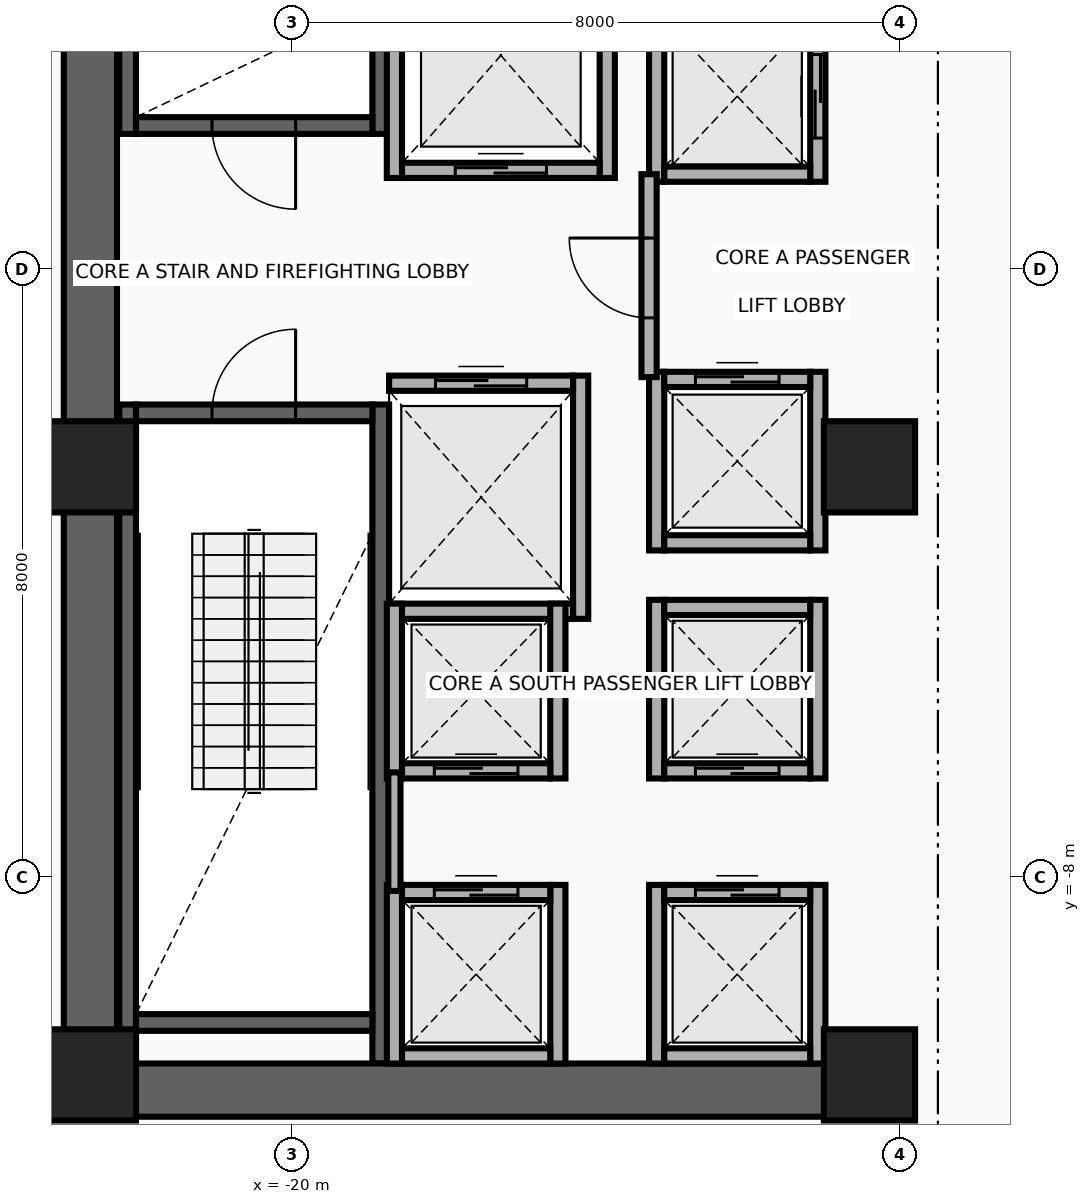
"""IFC4 building model, lengths in metres.
Left out: names, types, materials, properties, quantities, classifications, styles, units other than length and angle.
Written with IfcOpenShell. Run it as: python <this file> out.ifc"""

import sys

from ifc_helpers import new_model, si_unit, direction, frame, frame_2d, origin, origin_2d, place, context, subcontext, project, spatial, rectangle, extrude, source, transform, mapped, element, fill, save


model = new_model("IFC4")
c1 = context("Model", 3, precision=1e-05, world=origin(), true_north=direction((0.0, 1.0)))
c2 = subcontext(c1, "Body", "Model", "MODEL_VIEW")
j1 = project(units=[si_unit("LENGTHUNIT", "METRE"), si_unit("PLANEANGLEUNIT", "RADIAN")], contexts=[c1])
p1 = place(None, origin())
s1 = spatial("IfcSite", under=j1, at=p1, CompositionType="ELEMENT")
p2 = place(p1, origin())
s2 = spatial("IfcBuilding", under=s1, at=p2, CompositionType="ELEMENT")
p3 = place(p2, frame((0.0, 0.0, 101.1)))
s3 = spatial("IfcBuildingStorey", under=s2, at=p3, CompositionType="ELEMENT", Elevation=101.1)
for number, where, z_axis, x_axis in (
    (1, (-22.16, 1.78, 0.0), (0.0, 0.0, 1.0), (0.0, 1.0, 0.0)),
    (2, (-18.83, 1.78, 0.0), (0.0, 0.0, 1.0), (0.0, 1.0, 0.0)),
):
    element("IfcWall", number, at=place(p3, frame(where, z_axis=z_axis, x_axis=x_axis)), inside=s3, PredefinedType="SHEAR", context=c2, shape_type="SweptSolid", body=[
        extrude(rectangle(XDim=8.67, YDim=0.22, at=frame_2d((4.335, 0.0))), origin(), (0.0, 0.0, 1.0), 4.36),
    ])
p4 = place(p3, frame((-22.05, 1.89, 0.0), z_axis=(0.0, 0.0, 1.0), x_axis=(1.0, 0.0, 0.0)))
e3 = element("IfcWall", 3, at=p4, inside=s3, PredefinedType="SHEAR", context=c2, shape_type="SweptSolid", body=[
    extrude(rectangle(XDim=3.11, YDim=0.22, at=frame_2d((1.555, 0.0))), origin(), (0.0, 0.0, 1.0), 4.36),
])
p5 = place(p4, frame((1.0, 0.0, 0.0)))
e4 = element("IfcOpeningElement", 4, at=p5, cuts=e3, PredefinedType="OPENING", context=c2, shape_type="SweptSolid", body=[
    extrude(rectangle(XDim=1.1, YDim=2.15, at=frame_2d((0.55, 1.075))), frame((0.0, 0.125, 0.0), z_axis=(0.0, -1.0, 0.0), x_axis=(1.0, 0.0, 0.0)), (0.0, 0.0, 1.0), 0.25),
])
for number, where, z_axis, x_axis in (
    (5, (-22.16, -10.45, 0.0), (0.0, 0.0, 1.0), (0.0, 1.0, 0.0)),
    (6, (-18.83, -10.45, 0.0), (0.0, 0.0, 1.0), (0.0, 1.0, 0.0)),
):
    element("IfcWall", number, at=place(p3, frame(where, z_axis=z_axis, x_axis=x_axis)), inside=s3, PredefinedType="SHEAR", context=c2, shape_type="SweptSolid", body=[
        extrude(rectangle(XDim=8.67, YDim=0.22, at=frame_2d((4.335, 0.0))), origin(), (0.0, 0.0, 1.0), 4.36),
    ])
p6 = place(p3, frame((-22.05, -9.91, 0.0), z_axis=(0.0, 0.0, 1.0), x_axis=(1.0, 0.0, 0.0)))
e7 = element("IfcWall", 7, at=p6, inside=s3, PredefinedType="SHEAR", context=c2, shape_type="SweptSolid", body=[
    extrude(rectangle(XDim=3.11, YDim=0.22, at=frame_2d((1.555, 0.0))), origin(), (0.0, 0.0, 1.0), 4.36),
])
p7 = place(p3, frame((-22.05, -1.89, 0.0), z_axis=(0.0, 0.0, 1.0), x_axis=(1.0, 0.0, 0.0)))
e8 = element("IfcWall", 8, at=p7, inside=s3, PredefinedType="SHEAR", context=c2, shape_type="SweptSolid", body=[
    extrude(rectangle(XDim=3.11, YDim=0.22, at=frame_2d((1.555, 0.0))), origin(), (0.0, 0.0, 1.0), 4.36),
])
p8 = place(p7, frame((1.0, 0.0, 0.0)))
e9 = element("IfcOpeningElement", 9, at=p8, cuts=e8, PredefinedType="OPENING", context=c2, shape_type="SweptSolid", body=[
    extrude(rectangle(XDim=1.1, YDim=2.15, at=frame_2d((0.55, 1.075))), frame((0.0, 0.125, 0.0), z_axis=(0.0, -1.0, 0.0), x_axis=(1.0, 0.0, 0.0)), (0.0, 0.0, 1.0), 0.25),
])
p9 = place(p3, frame((-22.65, -11.15, 0.0), z_axis=(0.0, 0.0, 1.0), x_axis=(0.0, 1.0, 0.0)))
e10 = element("IfcWall", 10, at=p9, inside=s3, PredefinedType="SHEAR", context=c2, shape_type="SweptSolid", body=[
    extrude(rectangle(XDim=22.3, YDim=0.7, at=frame_2d((11.15, 0.0))), origin(), (0.0, 0.0, 1.0), 4.36),
])
p10 = place(p3, frame((-22.65, -10.8, 0.0), z_axis=(0.0, 0.0, 1.0), x_axis=(1.0, 0.0, 0.0)))
e11 = element("IfcWall", 11, at=p10, inside=s3, PredefinedType="SHEAR", context=c2, shape_type="SweptSolid", body=[
    extrude(rectangle(XDim=10.25, YDim=0.7, at=frame_2d((5.125, 0.0))), origin(), (0.0, 0.0, 1.0), 4.36),
])
m1 = source(origin(), c2, "Body", "SweptSolid", [
    extrude(rectangle(XDim=1.2, YDim=1.2, at=origin_2d()), origin(), (0.0, 0.0, 1.0), 4.6),
])
for number, where, z_axis, x_axis in (
    (12, (-22.65, -10.6, 0.0), (0.0, 0.0, 1.0), (1.0, 0.0, 0.0)),
    (13, (-12.4, -10.6, 0.0), (0.0, 0.0, 1.0), (1.0, 0.0, 0.0)),
    (14, (-22.65, -2.6, 0.0), (0.0, 0.0, 1.0), (1.0, 0.0, 0.0)),
    (15, (-12.4, -2.6, 0.0), (0.0, 0.0, 1.0), (1.0, 0.0, 0.0)),
):
    element("IfcColumn", number, at=place(p3, frame(where, z_axis=z_axis, x_axis=x_axis)), inside=s3, PredefinedType="COLUMN", context=c2, shape_type="MappedRepresentation", body=[
        mapped(m1, transform((0.0, 0.0, 0.0), x_axis=(1.0, 0.0, 0.0), y_axis=(0.0, 1.0, 0.0), z_axis=(0.0, 0.0, 1.0), scale=1.0)),
    ])
for number, where, z_axis, x_axis in (
    (16, (-18.65, 1.2, 0.0), (0.0, 0.0, 1.0), (0.0, 1.0, 0.0)),
    (17, (-15.85, 1.2, 0.0), (0.0, 0.0, 1.0), (0.0, 1.0, 0.0)),
):
    element("IfcWall", number, at=place(p3, frame(where, z_axis=z_axis, x_axis=x_axis)), inside=s3, PredefinedType="MOVABLE", context=c2, shape_type="SweptSolid", body=[
        extrude(rectangle(XDim=3.225, YDim=0.2, at=frame_2d((1.613, 0.0))), origin(), (0.0, 0.0, 1.0), 4.36),
    ])
p11 = place(p3, frame((-18.55, 1.3, 0.0), z_axis=(0.0, 0.0, 1.0), x_axis=(1.0, 0.0, 0.0)))
e18 = element("IfcWall", 18, at=p11, inside=s3, PredefinedType="MOVABLE", context=c2, shape_type="SweptSolid", body=[
    extrude(rectangle(XDim=2.6, YDim=0.2, at=frame_2d((1.3, 0.0))), origin(), (0.0, 0.0, 1.0), 4.36),
])
p12 = place(p11, frame((0.7, 0.0, 0.0)))
e19 = element("IfcOpeningElement", 19, at=p12, cuts=e18, PredefinedType="OPENING", context=c2, shape_type="SweptSolid", body=[
    extrude(rectangle(XDim=1.2, YDim=2.1, at=frame_2d((0.6, 1.05))), frame((0.0, 0.115, 0.0), z_axis=(0.0, -1.0, 0.0), x_axis=(1.0, 0.0, 0.0)), (0.0, 0.0, 1.0), 0.23),
])
p13 = place(p3, frame((-16.2, -4.6, 0.0), z_axis=(0.0, 0.0, 1.0), x_axis=(0.0, 1.0, 0.0)))
e20 = element("IfcWall", 20, at=p13, inside=s3, PredefinedType="MOVABLE", context=c2, shape_type="SweptSolid", body=[
    extrude(rectangle(XDim=3.2, YDim=0.2, at=frame_2d((1.6, 0.0))), origin(), (0.0, 0.0, 1.0), 4.36),
])
p14 = place(p3, frame((-18.72, -4.5, 0.0), z_axis=(0.0, 0.0, 1.0), x_axis=(1.0, 0.0, 0.0)))
e21 = element("IfcWall", 21, at=p14, inside=s3, PredefinedType="MOVABLE", context=c2, shape_type="SweptSolid", body=[
    extrude(rectangle(XDim=2.42, YDim=0.2, at=frame_2d((1.21, 0.0))), origin(), (0.0, 0.0, 1.0), 4.36),
])
p15 = place(p3, frame((-18.72, -1.5, 0.0), z_axis=(0.0, 0.0, 1.0), x_axis=(1.0, 0.0, 0.0)))
e22 = element("IfcWall", 22, at=p15, inside=s3, PredefinedType="MOVABLE", context=c2, shape_type="SweptSolid", body=[
    extrude(rectangle(XDim=2.42, YDim=0.2, at=frame_2d((1.21, 0.0))), origin(), (0.0, 0.0, 1.0), 4.36),
])
p16 = place(p15, frame((0.61, 0.0, 0.0)))
e23 = element("IfcOpeningElement", 23, at=p16, cuts=e22, PredefinedType="OPENING", context=c2, shape_type="SweptSolid", body=[
    extrude(rectangle(XDim=1.2, YDim=2.1, at=frame_2d((0.6, 1.05))), frame((0.0, 0.115, 0.0), z_axis=(0.0, -1.0, 0.0), x_axis=(1.0, 0.0, 0.0)), (0.0, 0.0, 1.0), 0.23),
])
for number, where, z_axis, x_axis in (
    (24, (-15.2, -10.45, 0.0), (0.0, 0.0, 1.0), (0.0, 1.0, 0.0)),
    (25, (-13.08, -10.45, 0.0), (0.0, 0.0, 1.0), (0.0, 1.0, 0.0)),
):
    element("IfcWall", number, at=place(p3, frame(where, z_axis=z_axis, x_axis=x_axis)), inside=s3, PredefinedType="MOVABLE", context=c2, shape_type="SweptSolid", body=[
        extrude(rectangle(XDim=2.35, YDim=0.2, at=frame_2d((1.175, 0.0))), origin(), (0.0, 0.0, 1.0), 3.566),
    ])
p17 = place(p3, frame((-15.1, -10.35, 0.0), z_axis=(0.0, 0.0, 1.0), x_axis=(1.0, 0.0, 0.0)))
e26 = element("IfcWall", 26, at=p17, inside=s3, PredefinedType="MOVABLE", context=c2, shape_type="SweptSolid", body=[
    extrude(rectangle(XDim=1.92, YDim=0.2, at=frame_2d((0.96, 0.0))), origin(), (0.0, 0.0, 1.0), 3.566),
])
p18 = place(p3, frame((-15.1, -8.2, 0.0), z_axis=(0.0, 0.0, 1.0), x_axis=(1.0, 0.0, 0.0)))
e27 = element("IfcWall", 27, at=p18, inside=s3, PredefinedType="MOVABLE", context=c2, shape_type="SweptSolid", body=[
    extrude(rectangle(XDim=1.92, YDim=0.2, at=frame_2d((0.96, 0.0))), origin(), (0.0, 0.0, 1.0), 4.36),
])
p19 = place(p18, frame((0.41, 0.0, 0.0)))
e28 = element("IfcOpeningElement", 28, at=p19, cuts=e27, PredefinedType="OPENING", context=c2, shape_type="SweptSolid", body=[
    extrude(rectangle(XDim=1.1, YDim=2.1, at=frame_2d((0.55, 1.05))), frame((0.0, 0.115, 0.0), z_axis=(0.0, -1.0, 0.0), x_axis=(1.0, 0.0, 0.0)), (0.0, 0.0, 1.0), 0.23),
])
for number, where, z_axis, x_axis in (
    (29, (-15.2, -6.7, 0.0), (0.0, 0.0, 1.0), (0.0, 1.0, 0.0)),
    (30, (-13.08, -6.7, 0.0), (0.0, 0.0, 1.0), (0.0, 1.0, 0.0)),
):
    element("IfcWall", number, at=place(p3, frame(where, z_axis=z_axis, x_axis=x_axis)), inside=s3, PredefinedType="MOVABLE", context=c2, shape_type="SweptSolid", body=[
        extrude(rectangle(XDim=2.35, YDim=0.2, at=frame_2d((1.175, 0.0))), origin(), (0.0, 0.0, 1.0), 4.36),
    ])
p20 = place(p3, frame((-15.1, -6.6, 0.0), z_axis=(0.0, 0.0, 1.0), x_axis=(1.0, 0.0, 0.0)))
e31 = element("IfcWall", 31, at=p20, inside=s3, PredefinedType="MOVABLE", context=c2, shape_type="SweptSolid", body=[
    extrude(rectangle(XDim=1.92, YDim=0.2, at=frame_2d((0.96, 0.0))), origin(), (0.0, 0.0, 1.0), 4.36),
])
p21 = place(p20, frame((0.41, 0.0, 0.0)))
e32 = element("IfcOpeningElement", 32, at=p21, cuts=e31, PredefinedType="OPENING", context=c2, shape_type="SweptSolid", body=[
    extrude(rectangle(XDim=1.1, YDim=2.1, at=frame_2d((0.55, 1.05))), frame((0.0, 0.115, 0.0), z_axis=(0.0, -1.0, 0.0), x_axis=(1.0, 0.0, 0.0)), (0.0, 0.0, 1.0), 0.23),
])
p22 = place(p3, frame((-15.1, -4.45, 0.0), z_axis=(0.0, 0.0, 1.0), x_axis=(1.0, 0.0, 0.0)))
e33 = element("IfcWall", 33, at=p22, inside=s3, PredefinedType="MOVABLE", context=c2, shape_type="SweptSolid", body=[
    extrude(rectangle(XDim=1.92, YDim=0.2, at=frame_2d((0.96, 0.0))), origin(), (0.0, 0.0, 1.0), 4.36),
])
for number, where, z_axis, x_axis in (
    (34, (-18.65, -10.45, 0.0), (0.0, 0.0, 1.0), (0.0, 1.0, 0.0)),
    (35, (-16.5, -10.45, 0.0), (0.0, 0.0, 1.0), (0.0, 1.0, 0.0)),
):
    element("IfcWall", number, at=place(p3, frame(where, z_axis=z_axis, x_axis=x_axis)), inside=s3, PredefinedType="MOVABLE", context=c2, shape_type="SweptSolid", body=[
        extrude(rectangle(XDim=2.35, YDim=0.2, at=frame_2d((1.175, 0.0))), origin(), (0.0, 0.0, 1.0), 3.566),
    ])
p23 = place(p3, frame((-18.55, -10.35, 0.0), z_axis=(0.0, 0.0, 1.0), x_axis=(1.0, 0.0, 0.0)))
e36 = element("IfcWall", 36, at=p23, inside=s3, PredefinedType="MOVABLE", context=c2, shape_type="SweptSolid", body=[
    extrude(rectangle(XDim=1.95, YDim=0.2, at=frame_2d((0.975, 0.0))), origin(), (0.0, 0.0, 1.0), 3.566),
])
p24 = place(p3, frame((-18.55, -8.2, 0.0), z_axis=(0.0, 0.0, 1.0), x_axis=(1.0, 0.0, 0.0)))
e37 = element("IfcWall", 37, at=p24, inside=s3, PredefinedType="MOVABLE", context=c2, shape_type="SweptSolid", body=[
    extrude(rectangle(XDim=1.95, YDim=0.2, at=frame_2d((0.975, 0.0))), origin(), (0.0, 0.0, 1.0), 4.36),
])
p25 = place(p24, frame((0.425, 0.0, 0.0)))
e38 = element("IfcOpeningElement", 38, at=p25, cuts=e37, PredefinedType="OPENING", context=c2, shape_type="SweptSolid", body=[
    extrude(rectangle(XDim=1.1, YDim=2.1, at=frame_2d((0.55, 1.05))), frame((0.0, 0.115, 0.0), z_axis=(0.0, -1.0, 0.0), x_axis=(1.0, 0.0, 0.0)), (0.0, 0.0, 1.0), 0.23),
])
p26 = place(p3, frame((-15.2, 1.15, 0.0), z_axis=(0.0, 0.0, 1.0), x_axis=(0.0, 1.0, 0.0)))
e39 = element("IfcWall", 39, at=p26, inside=s3, PredefinedType="MOVABLE", context=c2, shape_type="SweptSolid", body=[
    extrude(rectangle(XDim=2.25, YDim=0.2, at=frame_2d((1.125, 0.0))), origin(), (0.0, 0.0, 1.0), 4.36),
])
p27 = place(p3, frame((-13.08, 1.15, 0.0), z_axis=(0.0, 0.0, 1.0), x_axis=(0.0, 1.0, 0.0)))
e40 = element("IfcWall", 40, at=p27, inside=s3, PredefinedType="MOVABLE", context=c2, shape_type="SweptSolid", body=[
    extrude(rectangle(XDim=2.25, YDim=0.2, at=frame_2d((1.125, 0.0))), origin(), (0.0, 0.0, 1.0), 4.36),
])
p28 = place(p27, frame((0.575, 0.0, 0.0)))
e41 = element("IfcOpeningElement", 41, at=p28, cuts=e40, PredefinedType="OPENING", context=c2, shape_type="SweptSolid", body=[
    extrude(rectangle(XDim=1.1, YDim=2.1, at=frame_2d((0.55, 1.05))), frame((0.0, 0.115, 0.0), z_axis=(0.0, -1.0, 0.0), x_axis=(1.0, 0.0, 0.0)), (0.0, 0.0, 1.0), 0.23),
])
p29 = place(p3, frame((-15.1, 1.25, 0.0), z_axis=(0.0, 0.0, 1.0), x_axis=(1.0, 0.0, 0.0)))
e42 = element("IfcWall", 42, at=p29, inside=s3, PredefinedType="MOVABLE", context=c2, shape_type="SweptSolid", body=[
    extrude(rectangle(XDim=1.92, YDim=0.2, at=frame_2d((0.96, 0.0))), origin(), (0.0, 0.0, 1.0), 4.36),
])
for number, where, z_axis, x_axis in (
    (43, (-18.65, -6.7, 0.0), (0.0, 0.0, 1.0), (0.0, 1.0, 0.0)),
    (44, (-16.5, -6.7, 0.0), (0.0, 0.0, 1.0), (0.0, 1.0, 0.0)),
):
    element("IfcWall", number, at=place(p3, frame(where, z_axis=z_axis, x_axis=x_axis)), inside=s3, PredefinedType="MOVABLE", context=c2, shape_type="SweptSolid", body=[
        extrude(rectangle(XDim=2.3, YDim=0.2, at=frame_2d((1.15, 0.0))), origin(), (0.0, 0.0, 1.0), 4.36),
    ])
p30 = place(p3, frame((-18.55, -6.6, 0.0), z_axis=(0.0, 0.0, 1.0), x_axis=(1.0, 0.0, 0.0)))
e45 = element("IfcWall", 45, at=p30, inside=s3, PredefinedType="MOVABLE", context=c2, shape_type="SweptSolid", body=[
    extrude(rectangle(XDim=1.95, YDim=0.2, at=frame_2d((0.975, 0.0))), origin(), (0.0, 0.0, 1.0), 4.36),
])
p31 = place(p30, frame((0.425, 0.0, 0.0)))
e46 = element("IfcOpeningElement", 46, at=p31, cuts=e45, PredefinedType="OPENING", context=c2, shape_type="SweptSolid", body=[
    extrude(rectangle(XDim=1.1, YDim=2.1, at=frame_2d((0.55, 1.05))), frame((0.0, 0.115, 0.0), z_axis=(0.0, -1.0, 0.0), x_axis=(1.0, 0.0, 0.0)), (0.0, 0.0, 1.0), 0.23),
])
for number, where, z_axis, x_axis in (
    (47, (-15.2, -3.7, 0.0), (0.0, 0.0, 1.0), (0.0, 1.0, 0.0)),
    (48, (-13.08, -3.7, 0.0), (0.0, 0.0, 1.0), (0.0, 1.0, 0.0)),
):
    element("IfcWall", number, at=place(p3, frame(where, z_axis=z_axis, x_axis=x_axis)), inside=s3, PredefinedType="MOVABLE", context=c2, shape_type="SweptSolid", body=[
        extrude(rectangle(XDim=2.35, YDim=0.2, at=frame_2d((1.175, 0.0))), origin(), (0.0, 0.0, 1.0), 4.36),
    ])
p32 = place(p3, frame((-15.1, -3.6, 0.0), z_axis=(0.0, 0.0, 1.0), x_axis=(1.0, 0.0, 0.0)))
e49 = element("IfcWall", 49, at=p32, inside=s3, PredefinedType="MOVABLE", context=c2, shape_type="SweptSolid", body=[
    extrude(rectangle(XDim=1.92, YDim=0.2, at=frame_2d((0.96, 0.0))), origin(), (0.0, 0.0, 1.0), 4.36),
])
p33 = place(p3, frame((-15.1, -1.45, 0.0), z_axis=(0.0, 0.0, 1.0), x_axis=(1.0, 0.0, 0.0)))
e50 = element("IfcWall", 50, at=p33, inside=s3, PredefinedType="MOVABLE", context=c2, shape_type="SweptSolid", body=[
    extrude(rectangle(XDim=1.92, YDim=0.2, at=frame_2d((0.96, 0.0))), origin(), (0.0, 0.0, 1.0), 4.36),
])
p34 = place(p33, frame((0.41, 0.0, 0.0)))
e51 = element("IfcOpeningElement", 51, at=p34, cuts=e50, PredefinedType="OPENING", context=c2, shape_type="SweptSolid", body=[
    extrude(rectangle(XDim=1.1, YDim=2.1, at=frame_2d((0.55, 1.05))), frame((0.0, 0.115, 0.0), z_axis=(0.0, -1.0, 0.0), x_axis=(1.0, 0.0, 0.0)), (0.0, 0.0, 1.0), 0.23),
])
p35 = place(p3, frame((-15.3, -1.42, 0.0), z_axis=(0.0, 0.0, 1.0), x_axis=(0.0, 1.0, 0.0)))
e52 = element("IfcWall", 52, at=p35, inside=s3, PredefinedType="PARTITIONING", context=c2, shape_type="SweptSolid", body=[
    extrude(rectangle(XDim=2.67, YDim=0.2, at=frame_2d((1.335, 0.0))), origin(), (0.0, 0.0, 1.0), 4.36),
])
p36 = place(p35, frame((0.78, 0.0, 0.0)))
e53 = element("IfcOpeningElement", 53, at=p36, cuts=e52, PredefinedType="OPENING", context=c2, shape_type="SweptSolid", body=[
    extrude(rectangle(XDim=1.05, YDim=2.15, at=frame_2d((0.525, 1.075))), frame((0.0, 0.115, 0.0), z_axis=(0.0, -1.0, 0.0), x_axis=(1.0, 0.0, 0.0)), (0.0, 0.0, 1.0), 0.23),
])
p37 = place(p3, frame((-18.65, -8.18, 0.0), z_axis=(0.0, 0.0, 1.0), x_axis=(0.0, 1.0, 0.0)))
e54 = element("IfcWall", 54, at=p37, inside=s3, PredefinedType="PARTITIONING", context=c2, shape_type="SweptSolid", body=[
    extrude(rectangle(XDim=1.56, YDim=0.16, at=frame_2d((0.78, 0.0))), origin(), (0.0, 0.0, 1.0), 4.36),
])
p38 = place(p12, origin())
e55 = element("IfcDoor", 55, at=p38, inside=s3, OperationType="DOUBLE_DOOR_SLIDING", PredefinedType="DOOR", context=c2, shape_type="SweptSolid", body=[
    extrude(rectangle(XDim=1.2, YDim=2.1, at=frame_2d((0.6, 1.05))), frame((0.0, 0.025, 0.0), z_axis=(0.0, -1.0, 0.0), x_axis=(1.0, 0.0, 0.0)), (0.0, 0.0, 1.0), 0.05),
])
fill(e19, e55)
p39 = place(p16, origin())
e56 = element("IfcDoor", 56, at=p39, inside=s3, OperationType="DOUBLE_DOOR_SLIDING", PredefinedType="DOOR", context=c2, shape_type="SweptSolid", body=[
    extrude(rectangle(XDim=1.2, YDim=2.1, at=frame_2d((0.6, 1.05))), frame((0.0, 0.025, 0.0), z_axis=(0.0, -1.0, 0.0), x_axis=(1.0, 0.0, 0.0)), (0.0, 0.0, 1.0), 0.05),
])
fill(e23, e56)
p40 = place(p19, origin())
e57 = element("IfcDoor", 57, at=p40, inside=s3, OperationType="DOUBLE_DOOR_SLIDING", PredefinedType="DOOR", context=c2, shape_type="SweptSolid", body=[
    extrude(rectangle(XDim=1.1, YDim=2.1, at=frame_2d((0.55, 1.05))), frame((0.0, 0.025, 0.0), z_axis=(0.0, -1.0, 0.0), x_axis=(1.0, 0.0, 0.0)), (0.0, 0.0, 1.0), 0.05),
])
fill(e28, e57)
p41 = place(p21, origin())
e58 = element("IfcDoor", 58, at=p41, inside=s3, OperationType="DOUBLE_DOOR_SLIDING", PredefinedType="DOOR", context=c2, shape_type="SweptSolid", body=[
    extrude(rectangle(XDim=1.1, YDim=2.1, at=frame_2d((0.55, 1.05))), frame((0.0, 0.025, 0.0), z_axis=(0.0, -1.0, 0.0), x_axis=(1.0, 0.0, 0.0)), (0.0, 0.0, 1.0), 0.05),
])
fill(e32, e58)
p42 = place(p25, origin())
e59 = element("IfcDoor", 59, at=p42, inside=s3, OperationType="DOUBLE_DOOR_SLIDING", PredefinedType="DOOR", context=c2, shape_type="SweptSolid", body=[
    extrude(rectangle(XDim=1.1, YDim=2.1, at=frame_2d((0.55, 1.05))), frame((0.0, 0.025, 0.0), z_axis=(0.0, -1.0, 0.0), x_axis=(1.0, 0.0, 0.0)), (0.0, 0.0, 1.0), 0.05),
])
fill(e38, e59)
p43 = place(p28, origin())
e60 = element("IfcDoor", 60, at=p43, inside=s3, OperationType="DOUBLE_DOOR_SLIDING", PredefinedType="DOOR", context=c2, shape_type="SweptSolid", body=[
    extrude(rectangle(XDim=1.1, YDim=2.1, at=frame_2d((0.55, 1.05))), frame((0.0, 0.025, 0.0), z_axis=(0.0, -1.0, 0.0), x_axis=(1.0, 0.0, 0.0)), (0.0, 0.0, 1.0), 0.05),
])
fill(e41, e60)
p44 = place(p31, origin())
e61 = element("IfcDoor", 61, at=p44, inside=s3, OperationType="DOUBLE_DOOR_SLIDING", PredefinedType="DOOR", context=c2, shape_type="SweptSolid", body=[
    extrude(rectangle(XDim=1.1, YDim=2.1, at=frame_2d((0.55, 1.05))), frame((0.0, 0.025, 0.0), z_axis=(0.0, -1.0, 0.0), x_axis=(1.0, 0.0, 0.0)), (0.0, 0.0, 1.0), 0.05),
])
fill(e46, e61)
p45 = place(p34, origin())
e62 = element("IfcDoor", 62, at=p45, inside=s3, OperationType="DOUBLE_DOOR_SLIDING", PredefinedType="DOOR", context=c2, shape_type="SweptSolid", body=[
    extrude(rectangle(XDim=1.1, YDim=2.1, at=frame_2d((0.55, 1.05))), frame((0.0, 0.025, 0.0), z_axis=(0.0, -1.0, 0.0), x_axis=(1.0, 0.0, 0.0)), (0.0, 0.0, 1.0), 0.05),
])
fill(e51, e62)
p46 = place(p36, origin())
e63 = element("IfcDoor", 63, at=p46, inside=s3, OperationType="SINGLE_SWING_RIGHT", PredefinedType="DOOR", context=c2, shape_type="SweptSolid", body=[
    extrude(rectangle(XDim=1.05, YDim=2.15, at=frame_2d((0.525, 1.075))), frame((0.0, 0.025, 0.0), z_axis=(0.0, -1.0, 0.0), x_axis=(1.0, 0.0, 0.0)), (0.0, 0.0, 1.0), 0.05),
])
fill(e53, e63)
p47 = place(p5, frame((1.1, 0.0, 0.0), z_axis=(0.0, 0.0, 1.0), x_axis=(-1.0, 0.0, 0.0)))
e64 = element("IfcDoor", 64, at=p47, inside=s3, OperationType="SINGLE_SWING_LEFT", PredefinedType="DOOR", context=c2, shape_type="SweptSolid", body=[
    extrude(rectangle(XDim=1.1, YDim=2.15, at=frame_2d((0.55, 1.075))), frame((0.0, 0.025, 0.0), z_axis=(0.0, -1.0, 0.0), x_axis=(1.0, 0.0, 0.0)), (0.0, 0.0, 1.0), 0.05),
])
fill(e4, e64)
p48 = place(p8, origin())
e65 = element("IfcDoor", 65, at=p48, inside=s3, OperationType="SINGLE_SWING_RIGHT", PredefinedType="DOOR", context=c2, shape_type="SweptSolid", body=[
    extrude(rectangle(XDim=1.1, YDim=2.15, at=frame_2d((0.55, 1.075))), frame((0.0, 0.025, 0.0), z_axis=(0.0, -1.0, 0.0), x_axis=(1.0, 0.0, 0.0)), (0.0, 0.0, 1.0), 0.05),
])
fill(e9, e65)
save(model, sys.argv[1])
